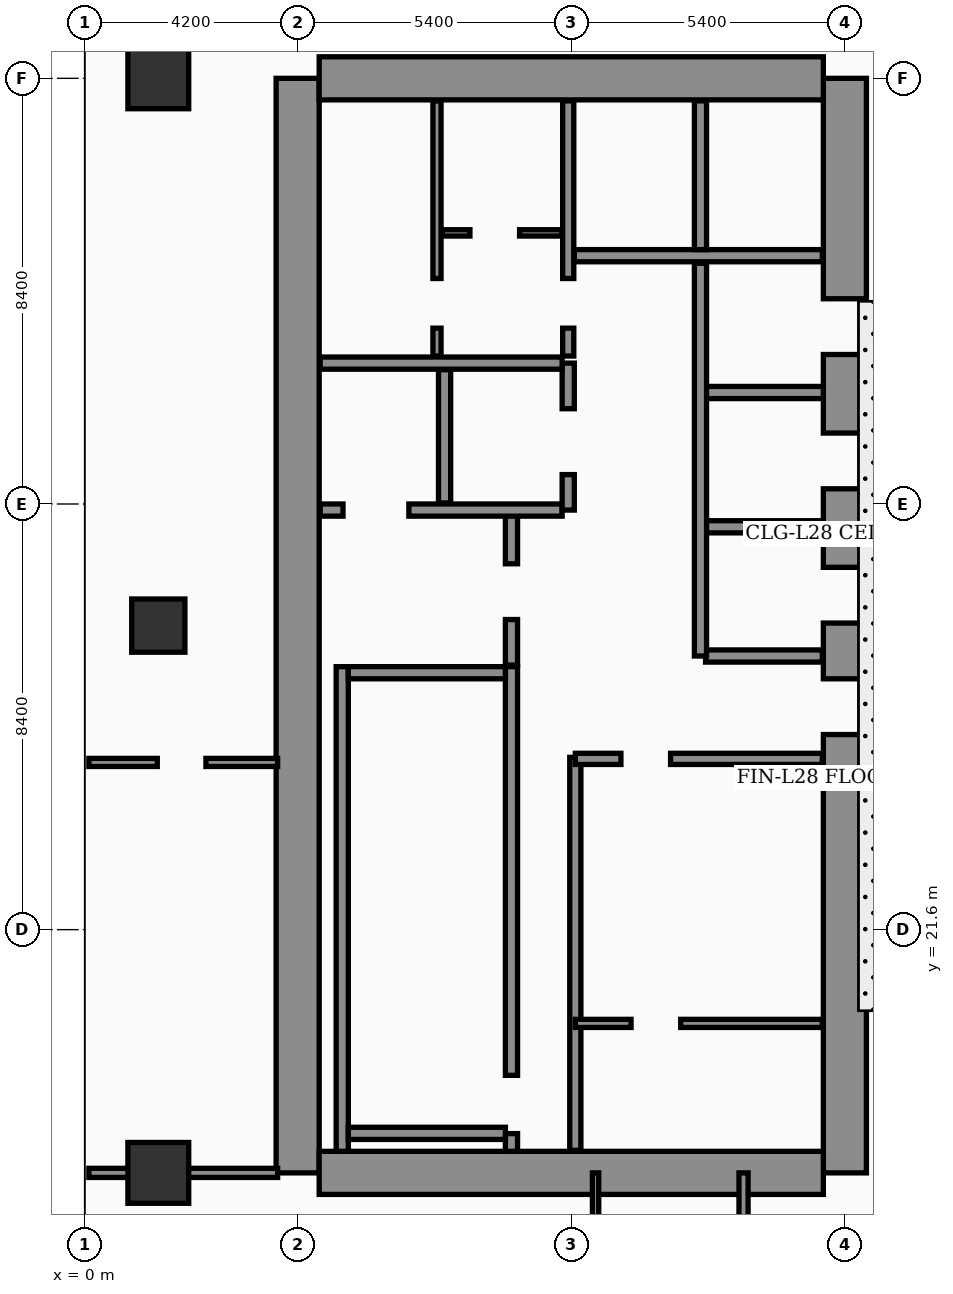
"""IFC4 building model, lengths in metres.
Left out: names, types, materials, properties, quantities, classifications, styles, units other than length and angle.
Written with IfcOpenShell. Run it as: python <this file> out.ifc"""

import sys

from ifc_helpers import new_model, si_unit, direction, frame, frame_2d, origin, origin_2d, place, context, subcontext, project, spatial, rectangle, extrude, element, fill, save


model = new_model("IFC4")
c1 = context("Model", 3, precision=1e-05, world=origin(), true_north=direction((0.0, 1.0)))
c2 = subcontext(c1, "Body", "Model", "MODEL_VIEW")
j1 = project(units=[si_unit("LENGTHUNIT", "METRE"), si_unit("PLANEANGLEUNIT", "RADIAN")], contexts=[c1])
p1 = place(None, origin())
s1 = spatial("IfcSite", under=j1, at=p1, CompositionType="ELEMENT")
p2 = place(p1, origin())
s2 = spatial("IfcBuilding", under=s1, at=p2, CompositionType="ELEMENT")
p3 = place(p2, frame((0.0, 0.0, 116.4)))
s3 = spatial("IfcBuildingStorey", under=s2, at=p3, CompositionType="ELEMENT", Elevation=116.4)
p4 = place(p3, frame((4.2, 16.8, 0.0), z_axis=(0.0, 0.0, 1.0), x_axis=(0.0, 1.0, 0.0)))
e1 = element("IfcWall", 1, at=p4, inside=s3, PredefinedType="SHEAR", context=c2, shape_type="SweptSolid", body=[
    extrude(rectangle(XDim=21.6, YDim=0.85, at=frame_2d((10.8, 0.0))), origin(), (0.0, 0.0, 1.0), 3.56),
])
p5 = place(p3, frame((15.0, 16.8, 0.0), z_axis=(0.0, 0.0, 1.0), x_axis=(0.0, 1.0, 0.0)))
e2 = element("IfcWall", 2, at=p5, inside=s3, PredefinedType="SHEAR", context=c2, shape_type="SweptSolid", body=[
    extrude(rectangle(XDim=21.6, YDim=0.85, at=frame_2d((10.8, 0.0))), origin(), (0.0, 0.0, 1.0), 3.56),
])
p6 = place(p5, frame((8.65, 0.0, 0.0)))
e3 = element("IfcOpeningElement", 3, at=p6, cuts=e2, PredefinedType="OPENING", context=c2, shape_type="SweptSolid", body=[
    extrude(rectangle(XDim=1.1, YDim=2.2, at=frame_2d((0.55, 1.1))), frame((0.0, 0.435, 0.0), z_axis=(0.0, -1.0, 0.0), x_axis=(1.0, 0.0, 0.0)), (0.0, 0.0, 1.0), 0.87),
])
p7 = place(p5, frame((10.85, 0.0, 0.0)))
e4 = element("IfcOpeningElement", 4, at=p7, cuts=e2, PredefinedType="OPENING", context=c2, shape_type="SweptSolid", body=[
    extrude(rectangle(XDim=1.1, YDim=2.2, at=frame_2d((0.55, 1.1))), frame((0.0, 0.435, 0.0), z_axis=(0.0, -1.0, 0.0), x_axis=(1.0, 0.0, 0.0)), (0.0, 0.0, 1.0), 0.87),
])
p8 = place(p5, frame((13.5, 0.0, 0.0)))
e5 = element("IfcOpeningElement", 5, at=p8, cuts=e2, PredefinedType="OPENING", context=c2, shape_type="SweptSolid", body=[
    extrude(rectangle(XDim=1.1, YDim=2.2, at=frame_2d((0.55, 1.1))), frame((0.0, 0.435, 0.0), z_axis=(0.0, -1.0, 0.0), x_axis=(1.0, 0.0, 0.0)), (0.0, 0.0, 1.0), 0.87),
])
p9 = place(p5, frame((16.15, 0.0, 0.0)))
e6 = element("IfcOpeningElement", 6, at=p9, cuts=e2, PredefinedType="OPENING", context=c2, shape_type="SweptSolid", body=[
    extrude(rectangle(XDim=1.1, YDim=2.2, at=frame_2d((0.55, 1.1))), frame((0.0, 0.435, 0.0), z_axis=(0.0, -1.0, 0.0), x_axis=(1.0, 0.0, 0.0)), (0.0, 0.0, 1.0), 0.87),
])
for number, where, z_axis, x_axis in (
    (7, (4.625, 38.4, 0.0), (0.0, 0.0, 1.0), (1.0, 0.0, 0.0)),
    (8, (4.625, 16.8, 0.0), (0.0, 0.0, 1.0), (1.0, 0.0, 0.0)),
):
    element("IfcWall", number, at=place(p3, frame(where, z_axis=z_axis, x_axis=x_axis)), inside=s3, PredefinedType="SHEAR", context=c2, shape_type="SweptSolid", body=[
        extrude(rectangle(XDim=9.95, YDim=0.85, at=frame_2d((4.975, 0.0))), origin(), (0.0, 0.0, 1.0), 3.56),
    ])
p10 = place(p3, frame((5.08, 17.225, 0.0), z_axis=(0.0, 0.0, 1.0), x_axis=(0.0, 1.0, 0.0)))
e9 = element("IfcWall", 9, at=p10, inside=s3, PredefinedType="SOLIDWALL", context=c2, shape_type="SweptSolid", body=[
    extrude(rectangle(XDim=9.565, YDim=0.24, at=frame_2d((4.782, 0.0))), origin(), (0.0, 0.0, 1.0), 3.56),
])
p11 = place(p3, frame((8.42, 17.225, 0.0), z_axis=(0.0, 0.0, 1.0), x_axis=(0.0, 1.0, 0.0)))
e10 = element("IfcWall", 10, at=p11, inside=s3, PredefinedType="SOLIDWALL", context=c2, shape_type="SweptSolid", body=[
    extrude(rectangle(XDim=9.565, YDim=0.24, at=frame_2d((4.782, 0.0))), origin(), (0.0, 0.0, 1.0), 3.56),
])
p12 = place(p11, frame((0.35, 0.0, 0.0)))
e11 = element("IfcOpeningElement", 11, at=p12, cuts=e10, PredefinedType="OPENING", context=c2, shape_type="SweptSolid", body=[
    extrude(rectangle(XDim=1.15, YDim=2.2, at=frame_2d((0.575, 1.1))), frame((0.0, 0.13, 0.0), z_axis=(0.0, -1.0, 0.0), x_axis=(1.0, 0.0, 0.0)), (0.0, 0.0, 1.0), 0.26),
])
for number, where, z_axis, x_axis in (
    (12, (5.2, 17.58, 0.0), (0.0, 0.0, 1.0), (1.0, 0.0, 0.0)),
    (13, (5.2, 26.67, 0.0), (0.0, 0.0, 1.0), (1.0, 0.0, 0.0)),
):
    element("IfcWall", number, at=place(p3, frame(where, z_axis=z_axis, x_axis=x_axis)), inside=s3, PredefinedType="SOLIDWALL", context=c2, shape_type="SweptSolid", body=[
        extrude(rectangle(XDim=3.1, YDim=0.24, at=frame_2d((1.55, 0.0))), origin(), (0.0, 0.0, 1.0), 3.56),
    ])
for number, where, z_axis, x_axis in (
    (14, (12.18, 29.55, 0.0), (0.0, 0.0, 1.0), (1.0, 0.0, 0.0)),
    (15, (12.18, 32.2, 0.0), (0.0, 0.0, 1.0), (1.0, 0.0, 0.0)),
):
    element("IfcWall", number, at=place(p3, frame(where, z_axis=z_axis, x_axis=x_axis)), inside=s3, PredefinedType="SOLIDWALL", context=c2, shape_type="SweptSolid", body=[
        extrude(rectangle(XDim=2.395, YDim=0.24, at=frame_2d((1.198, 0.0))), origin(), (0.0, 0.0, 1.0), 3.56),
    ])
p13 = place(p3, frame((1.45, 16.8, 0.0), z_axis=(0.0, 0.0, 1.0), x_axis=(1.0, 0.0, 0.0)))
e16 = element("IfcColumn", 16, at=p13, inside=s3, PredefinedType="COLUMN", context=c2, shape_type="SweptSolid", body=[
    extrude(rectangle(XDim=1.2, YDim=1.2, at=origin_2d()), origin(), (0.0, 0.0, 1.0), 3.56),
])
p14 = place(p3, frame((1.45, 27.6, 0.0), z_axis=(0.0, 0.0, 1.0), x_axis=(1.0, 0.0, 0.0)))
e17 = element("IfcColumn", 17, at=p14, inside=s3, PredefinedType="COLUMN", context=c2, shape_type="SweptSolid", body=[
    extrude(rectangle(XDim=1.05, YDim=1.05, at=origin_2d()), origin(), (0.0, 0.0, 1.0), 3.56),
])
p15 = place(p3, frame((1.45, 38.4, 0.0), z_axis=(0.0, 0.0, 1.0), x_axis=(1.0, 0.0, 0.0)))
e18 = element("IfcColumn", 18, at=p15, inside=s3, PredefinedType="COLUMN", context=c2, shape_type="SweptSolid", body=[
    extrude(rectangle(XDim=1.2, YDim=1.2, at=origin_2d()), origin(), (0.0, 0.0, 1.0), 3.56),
])
p16 = place(p3, frame((8.42, 26.82, 0.0), z_axis=(0.0, 0.0, 1.0), x_axis=(0.0, 1.0, 0.0)))
e19 = element("IfcWall", 19, at=p16, inside=s3, PredefinedType="SOLIDWALL", context=c2, shape_type="SweptSolid", body=[
    extrude(rectangle(XDim=3.0, YDim=0.24, at=frame_2d((1.5, 0.0))), origin(), (0.0, 0.0, 1.0), 3.56),
])
p17 = place(p16, frame((0.9, 0.0, 0.0)))
e20 = element("IfcOpeningElement", 20, at=p17, cuts=e19, PredefinedType="OPENING", context=c2, shape_type="SweptSolid", body=[
    extrude(rectangle(XDim=1.1, YDim=2.2, at=frame_2d((0.55, 1.1))), frame((0.0, 0.13, 0.0), z_axis=(0.0, -1.0, 0.0), x_axis=(1.0, 0.0, 0.0)), (0.0, 0.0, 1.0), 0.26),
])
p18 = place(p3, frame((4.645, 29.88, 0.0), z_axis=(0.0, 0.0, 1.0), x_axis=(1.0, 0.0, 0.0)))
e21 = element("IfcWall", 21, at=p18, inside=s3, PredefinedType="SOLIDWALL", context=c2, shape_type="SweptSolid", body=[
    extrude(rectangle(XDim=4.775, YDim=0.24, at=frame_2d((2.387, 0.0))), origin(), (0.0, 0.0, 1.0), 3.56),
])
p19 = place(p18, frame((0.45, 0.0, 0.0)))
e22 = element("IfcOpeningElement", 22, at=p19, cuts=e21, PredefinedType="OPENING", context=c2, shape_type="SweptSolid", body=[
    extrude(rectangle(XDim=1.3, YDim=2.35, at=frame_2d((0.65, 1.175))), frame((0.0, 0.13, 0.0), z_axis=(0.0, -1.0, 0.0), x_axis=(1.0, 0.0, 0.0)), (0.0, 0.0, 1.0), 0.26),
])
p20 = place(p3, frame((7.1, 30.02, 0.0), z_axis=(0.0, 0.0, 1.0), x_axis=(0.0, 1.0, 0.0)))
e23 = element("IfcWall", 23, at=p20, inside=s3, PredefinedType="SOLIDWALL", context=c2, shape_type="SweptSolid", body=[
    extrude(rectangle(XDim=2.63, YDim=0.24, at=frame_2d((1.315, 0.0))), origin(), (0.0, 0.0, 1.0), 3.56),
])
p21 = place(p3, frame((9.54, 29.88, 0.0), z_axis=(0.0, 0.0, 1.0), x_axis=(0.0, 1.0, 0.0)))
e24 = element("IfcWall", 24, at=p21, inside=s3, PredefinedType="SOLIDWALL", context=c2, shape_type="SweptSolid", body=[
    extrude(rectangle(XDim=2.9, YDim=0.24, at=frame_2d((1.45, 0.0))), origin(), (0.0, 0.0, 1.0), 3.56),
])
p22 = place(p21, frame((0.7, 0.0, 0.0)))
e25 = element("IfcOpeningElement", 25, at=p22, cuts=e24, PredefinedType="OPENING", context=c2, shape_type="SweptSolid", body=[
    extrude(rectangle(XDim=1.3, YDim=2.35, at=frame_2d((0.65, 1.175))), frame((0.0, 0.13, 0.0), z_axis=(0.0, -1.0, 0.0), x_axis=(1.0, 0.0, 0.0)), (0.0, 0.0, 1.0), 0.26),
])
p23 = place(p3, frame((4.645, 32.78, 0.0), z_axis=(0.0, 0.0, 1.0), x_axis=(1.0, 0.0, 0.0)))
e26 = element("IfcWall", 26, at=p23, inside=s3, PredefinedType="SOLIDWALL", context=c2, shape_type="SweptSolid", body=[
    extrude(rectangle(XDim=4.775, YDim=0.24, at=frame_2d((2.387, 0.0))), origin(), (0.0, 0.0, 1.0), 3.19),
])
p24 = place(p3, frame((9.68, 17.245, 0.0), z_axis=(0.0, 0.0, 1.0), x_axis=(0.0, 1.0, 0.0)))
e27 = element("IfcWall", 27, at=p24, inside=s3, PredefinedType="SOLIDWALL", context=c2, shape_type="SweptSolid", body=[
    extrude(rectangle(XDim=7.755, YDim=0.22, at=frame_2d((3.877, 0.0))), origin(), (0.0, 0.0, 1.0), 3.56),
])
p25 = place(p3, frame((6.95, 32.92, 0.0), z_axis=(0.0, 0.0, 1.0), x_axis=(0.0, 1.0, 0.0)))
e28 = element("IfcWall", 28, at=p25, inside=s3, PredefinedType="PARTITIONING", context=c2, shape_type="SweptSolid", body=[
    extrude(rectangle(XDim=5.035, YDim=0.16, at=frame_2d((2.518, 0.0))), origin(), (0.0, 0.0, 1.0), 3.56),
])
p26 = place(p25, frame((0.55, 0.0, 0.0)))
e29 = element("IfcOpeningElement", 29, at=p26, cuts=e28, PredefinedType="OPENING", context=c2, shape_type="SweptSolid", body=[
    extrude(rectangle(XDim=0.98, YDim=2.15, at=frame_2d((0.49, 1.075))), frame((0.0, 0.09, 0.0), z_axis=(0.0, -1.0, 0.0), x_axis=(1.0, 0.0, 0.0)), (0.0, 0.0, 1.0), 0.18),
])
p27 = place(p3, frame((7.05, 35.35, 0.0), z_axis=(0.0, 0.0, 1.0), x_axis=(1.0, 0.0, 0.0)))
e30 = element("IfcWall", 30, at=p27, inside=s3, PredefinedType="PARTITIONING", context=c2, shape_type="SweptSolid", body=[
    extrude(rectangle(XDim=2.37, YDim=0.125, at=frame_2d((1.185, 0.0))), origin(), (0.0, 0.0, 1.0), 3.56),
])
p28 = place(p27, frame((0.55, 0.0, 0.0)))
e31 = element("IfcOpeningElement", 31, at=p28, cuts=e30, PredefinedType="OPENING", context=c2, shape_type="SweptSolid", body=[
    extrude(rectangle(XDim=0.98, YDim=2.15, at=frame_2d((0.49, 1.075))), frame((0.0, 0.073, 0.0), z_axis=(0.0, -1.0, 0.0), x_axis=(1.0, 0.0, 0.0)), (0.0, 0.0, 1.0), 0.145),
])
p29 = place(p3, frame((9.54, 32.92, 0.0), z_axis=(0.0, 0.0, 1.0), x_axis=(0.0, 1.0, 0.0)))
e32 = element("IfcWall", 32, at=p29, inside=s3, PredefinedType="SOLIDWALL", context=c2, shape_type="SweptSolid", body=[
    extrude(rectangle(XDim=5.035, YDim=0.22, at=frame_2d((2.518, 0.0))), origin(), (0.0, 0.0, 1.0), 3.56),
])
p30 = place(p29, frame((0.55, 0.0, 0.0)))
e33 = element("IfcOpeningElement", 33, at=p30, cuts=e32, PredefinedType="OPENING", context=c2, shape_type="SweptSolid", body=[
    extrude(rectangle(XDim=0.98, YDim=2.15, at=frame_2d((0.49, 1.075))), frame((0.0, 0.12, 0.0), z_axis=(0.0, -1.0, 0.0), x_axis=(1.0, 0.0, 0.0)), (0.0, 0.0, 1.0), 0.24),
])
p31 = place(p3, frame((9.68, 19.75, 0.0), z_axis=(0.0, 0.0, 1.0), x_axis=(1.0, 0.0, 0.0)))
e34 = element("IfcWall", 34, at=p31, inside=s3, PredefinedType="PARTITIONING", context=c2, shape_type="SweptSolid", body=[
    extrude(rectangle(XDim=4.875, YDim=0.16, at=frame_2d((2.438, 0.0))), origin(), (0.0, 0.0, 1.0), 3.56),
])
p32 = place(p31, frame((1.1, 0.0, 0.0)))
e35 = element("IfcOpeningElement", 35, at=p32, cuts=e34, PredefinedType="OPENING", context=c2, shape_type="SweptSolid", body=[
    extrude(rectangle(XDim=0.98, YDim=2.15, at=frame_2d((0.49, 1.075))), frame((0.0, 0.09, 0.0), z_axis=(0.0, -1.0, 0.0), x_axis=(1.0, 0.0, 0.0)), (0.0, 0.0, 1.0), 0.18),
])
p33 = place(p3, frame((9.68, 24.97, 0.0), z_axis=(0.0, 0.0, 1.0), x_axis=(1.0, 0.0, 0.0)))
e36 = element("IfcWall", 36, at=p33, inside=s3, PredefinedType="SOLIDWALL", context=c2, shape_type="SweptSolid", body=[
    extrude(rectangle(XDim=4.875, YDim=0.22, at=frame_2d((2.438, 0.0))), origin(), (0.0, 0.0, 1.0), 2.84),
])
p34 = place(p33, frame((0.9, 0.0, 0.0)))
e37 = element("IfcOpeningElement", 37, at=p34, cuts=e36, PredefinedType="OPENING", context=c2, shape_type="SweptSolid", body=[
    extrude(rectangle(XDim=0.98, YDim=2.15, at=frame_2d((0.49, 1.075))), frame((0.0, 0.12, 0.0), z_axis=(0.0, -1.0, 0.0), x_axis=(1.0, 0.0, 0.0)), (0.0, 0.0, 1.0), 0.24),
])
p35 = place(p3, frame((12.25, 27.0, 0.0), z_axis=(0.0, 0.0, 1.0), x_axis=(1.0, 0.0, 0.0)))
e38 = element("IfcWall", 38, at=p35, inside=s3, PredefinedType="SOLIDWALL", context=c2, shape_type="SweptSolid", body=[
    extrude(rectangle(XDim=2.305, YDim=0.24, at=frame_2d((1.152, 0.0))), origin(), (0.0, 0.0, 1.0), 3.56),
])
p36 = place(p3, frame((12.15, 27.0, 0.0), z_axis=(0.0, 0.0, 1.0), x_axis=(0.0, 1.0, 0.0)))
e39 = element("IfcWall", 39, at=p36, inside=s3, PredefinedType="SOLIDWALL", context=c2, shape_type="SweptSolid", body=[
    extrude(rectangle(XDim=7.75, YDim=0.24, at=frame_2d((3.875, 0.0))), origin(), (0.0, 0.0, 1.0), 3.56),
])
p37 = place(p3, frame((9.66, 34.9, 0.0), z_axis=(0.0, 0.0, 1.0), x_axis=(1.0, 0.0, 0.0)))
e40 = element("IfcWall", 40, at=p37, inside=s3, PredefinedType="SOLIDWALL", context=c2, shape_type="SweptSolid", body=[
    extrude(rectangle(XDim=4.895, YDim=0.24, at=frame_2d((2.448, 0.0))), origin(), (0.0, 0.0, 1.0), 3.56),
])
p38 = place(p3, frame((12.15, 35.02, 0.0), z_axis=(0.0, 0.0, 1.0), x_axis=(0.0, 1.0, 0.0)))
e41 = element("IfcWall", 41, at=p38, inside=s3, PredefinedType="SOLIDWALL", context=c2, shape_type="SweptSolid", body=[
    extrude(rectangle(XDim=2.935, YDim=0.24, at=frame_2d((1.468, 0.0))), origin(), (0.0, 0.0, 1.0), 3.56),
])
p39 = place(p3, frame((0.08, 24.9, 0.0), z_axis=(0.0, 0.0, 1.0), x_axis=(1.0, 0.0, 0.0)))
e42 = element("IfcWall", 42, at=p39, inside=s3, PredefinedType="PARTITIONING", context=c2, shape_type="SweptSolid", body=[
    extrude(rectangle(XDim=3.725, YDim=0.16, at=frame_2d((1.862, 0.0))), origin(), (0.0, 0.0, 1.0), 3.04),
])
p40 = place(p39, frame((1.35, 0.0, 0.0)))
e43 = element("IfcOpeningElement", 43, at=p40, cuts=e42, PredefinedType="OPENING", context=c2, shape_type="SweptSolid", body=[
    extrude(rectangle(XDim=0.96, YDim=2.2, at=frame_2d((0.48, 1.1))), frame((0.0, 0.09, 0.0), z_axis=(0.0, -1.0, 0.0), x_axis=(1.0, 0.0, 0.0)), (0.0, 0.0, 1.0), 0.18),
])
p41 = place(p3, frame((0.08, 16.8, 0.0), z_axis=(0.0, 0.0, 1.0), x_axis=(1.0, 0.0, 0.0)))
e44 = element("IfcWall", 44, at=p41, inside=s3, PredefinedType="PARTITIONING", context=c2, shape_type="SweptSolid", body=[
    extrude(rectangle(XDim=3.725, YDim=0.18, at=frame_2d((1.862, 0.0))), origin(), (0.0, 0.0, 1.0), 2.84),
])
p42 = place(p3, frame((10.08, 14.55, 0.0), z_axis=(0.0, 0.0, 1.0), x_axis=(0.0, 1.0, 0.0)))
e45 = element("IfcWall", 45, at=p42, inside=s3, PredefinedType="PARTITIONING", context=c2, shape_type="SweptSolid", body=[
    extrude(rectangle(XDim=2.25, YDim=0.125, at=frame_2d((1.125, 0.0))), origin(), (0.0, 0.0, 1.0), 3.56),
])
p43 = place(p3, frame((13.0, 2.44, 0.0), z_axis=(0.0, 0.0, 1.0), x_axis=(0.0, 1.0, 0.0)))
e46 = element("IfcWall", 46, at=p43, inside=s3, PredefinedType="PARTITIONING", context=c2, shape_type="SweptSolid", body=[
    extrude(rectangle(XDim=14.36, YDim=0.18, at=frame_2d((7.18, 0.0))), origin(), (0.0, 0.0, 1.0), 2.84),
])
p44 = place(p43, frame((3.01, 0.0, 0.0)))
e47 = element("IfcOpeningElement", 47, at=p44, cuts=e46, PredefinedType="OPENING", context=c2, shape_type="SweptSolid", body=[
    extrude(rectangle(XDim=1.02, YDim=2.2, at=frame_2d((0.51, 1.1))), frame((0.0, 0.1, 0.0), z_axis=(0.0, -1.0, 0.0), x_axis=(1.0, 0.0, 0.0)), (0.0, 0.0, 1.0), 0.2),
])
p45 = place(p17, origin())
e48 = element("IfcDoor", 48, at=p45, inside=s3, OperationType="SINGLE_SWING_RIGHT", PredefinedType="DOOR", context=c2, shape_type="SweptSolid", body=[
    extrude(rectangle(XDim=1.1, YDim=2.2, at=frame_2d((0.55, 1.1))), frame((0.0, 0.025, 0.0), z_axis=(0.0, -1.0, 0.0), x_axis=(1.0, 0.0, 0.0)), (0.0, 0.0, 1.0), 0.05),
])
fill(e20, e48)
p46 = place(p19, origin())
e49 = element("IfcDoor", 49, at=p46, inside=s3, OperationType="DOUBLE_DOOR_SLIDING", PredefinedType="DOOR", context=c2, shape_type="SweptSolid", body=[
    extrude(rectangle(XDim=1.3, YDim=2.35, at=frame_2d((0.65, 1.175))), frame((0.0, 0.025, 0.0), z_axis=(0.0, -1.0, 0.0), x_axis=(1.0, 0.0, 0.0)), (0.0, 0.0, 1.0), 0.05),
])
fill(e22, e49)
p47 = place(p22, origin())
e50 = element("IfcDoor", 50, at=p47, inside=s3, OperationType="DOUBLE_DOOR_SLIDING", PredefinedType="DOOR", context=c2, shape_type="SweptSolid", body=[
    extrude(rectangle(XDim=1.3, YDim=2.35, at=frame_2d((0.65, 1.175))), frame((0.0, 0.025, 0.0), z_axis=(0.0, -1.0, 0.0), x_axis=(1.0, 0.0, 0.0)), (0.0, 0.0, 1.0), 0.05),
])
fill(e25, e50)
p48 = place(p26, origin())
e51 = element("IfcDoor", 51, at=p48, inside=s3, OperationType="SINGLE_SWING_LEFT", PredefinedType="DOOR", context=c2, shape_type="SweptSolid", body=[
    extrude(rectangle(XDim=0.98, YDim=2.15, at=frame_2d((0.49, 1.075))), frame((0.0, 0.025, 0.0), z_axis=(0.0, -1.0, 0.0), x_axis=(1.0, 0.0, 0.0)), (0.0, 0.0, 1.0), 0.05),
])
fill(e29, e51)
p49 = place(p28, origin())
e52 = element("IfcDoor", 52, at=p49, inside=s3, OperationType="SINGLE_SWING_RIGHT", PredefinedType="DOOR", context=c2, shape_type="SweptSolid", body=[
    extrude(rectangle(XDim=0.98, YDim=2.15, at=frame_2d((0.49, 1.075))), frame((0.0, 0.025, 0.0), z_axis=(0.0, -1.0, 0.0), x_axis=(1.0, 0.0, 0.0)), (0.0, 0.0, 1.0), 0.05),
])
fill(e31, e52)
p50 = place(p30, origin())
e53 = element("IfcDoor", 53, at=p50, inside=s3, OperationType="SINGLE_SWING_LEFT", PredefinedType="DOOR", context=c2, shape_type="SweptSolid", body=[
    extrude(rectangle(XDim=0.98, YDim=2.15, at=frame_2d((0.49, 1.075))), frame((0.0, 0.025, 0.0), z_axis=(0.0, -1.0, 0.0), x_axis=(1.0, 0.0, 0.0)), (0.0, 0.0, 1.0), 0.05),
])
fill(e33, e53)
p51 = place(p32, origin())
e54 = element("IfcDoor", 54, at=p51, inside=s3, OperationType="SINGLE_SWING_LEFT", PredefinedType="DOOR", context=c2, shape_type="SweptSolid", body=[
    extrude(rectangle(XDim=0.98, YDim=2.15, at=frame_2d((0.49, 1.075))), frame((0.0, 0.025, 0.0), z_axis=(0.0, -1.0, 0.0), x_axis=(1.0, 0.0, 0.0)), (0.0, 0.0, 1.0), 0.05),
])
fill(e35, e54)
p52 = place(p34, origin())
e55 = element("IfcDoor", 55, at=p52, inside=s3, OperationType="SINGLE_SWING_RIGHT", PredefinedType="DOOR", context=c2, shape_type="SweptSolid", body=[
    extrude(rectangle(XDim=0.98, YDim=2.15, at=frame_2d((0.49, 1.075))), frame((0.0, 0.025, 0.0), z_axis=(0.0, -1.0, 0.0), x_axis=(1.0, 0.0, 0.0)), (0.0, 0.0, 1.0), 0.05),
])
fill(e37, e55)
p53 = place(p40, origin())
e56 = element("IfcDoor", 56, at=p53, inside=s3, OperationType="SINGLE_SWING_LEFT", PredefinedType="DOOR", context=c2, shape_type="SweptSolid", body=[
    extrude(rectangle(XDim=0.96, YDim=2.2, at=frame_2d((0.48, 1.1))), frame((0.0, 0.025, 0.0), z_axis=(0.0, -1.0, 0.0), x_axis=(1.0, 0.0, 0.0)), (0.0, 0.0, 1.0), 0.05),
])
fill(e43, e56)
p54 = place(p12, origin())
e57 = element("IfcDoor", 57, at=p54, inside=s3, OperationType="SINGLE_SWING_LEFT", PredefinedType="DOOR", context=c2, shape_type="SweptSolid", body=[
    extrude(rectangle(XDim=1.15, YDim=2.2, at=frame_2d((0.575, 1.1))), frame((0.0, 0.025, 0.0), z_axis=(0.0, -1.0, 0.0), x_axis=(1.0, 0.0, 0.0)), (0.0, 0.0, 1.0), 0.05),
])
fill(e11, e57)
p55 = place(p6, origin())
e58 = element("IfcDoor", 58, at=p55, inside=s3, OperationType="SINGLE_SWING_LEFT", PredefinedType="DOOR", context=c2, shape_type="SweptSolid", body=[
    extrude(rectangle(XDim=1.1, YDim=2.2, at=frame_2d((0.55, 1.1))), frame((0.0, 0.025, 0.0), z_axis=(0.0, -1.0, 0.0), x_axis=(1.0, 0.0, 0.0)), (0.0, 0.0, 1.0), 0.05),
])
fill(e3, e58)
p56 = place(p7, origin())
e59 = element("IfcDoor", 59, at=p56, inside=s3, OperationType="DOUBLE_DOOR_SLIDING", PredefinedType="DOOR", context=c2, shape_type="SweptSolid", body=[
    extrude(rectangle(XDim=1.1, YDim=2.2, at=frame_2d((0.55, 1.1))), frame((0.0, 0.025, 0.0), z_axis=(0.0, -1.0, 0.0), x_axis=(1.0, 0.0, 0.0)), (0.0, 0.0, 1.0), 0.05),
])
fill(e4, e59)
p57 = place(p8, origin())
e60 = element("IfcDoor", 60, at=p57, inside=s3, OperationType="DOUBLE_DOOR_SLIDING", PredefinedType="DOOR", context=c2, shape_type="SweptSolid", body=[
    extrude(rectangle(XDim=1.1, YDim=2.2, at=frame_2d((0.55, 1.1))), frame((0.0, 0.025, 0.0), z_axis=(0.0, -1.0, 0.0), x_axis=(1.0, 0.0, 0.0)), (0.0, 0.0, 1.0), 0.05),
])
fill(e5, e60)
p58 = place(p9, origin())
e61 = element("IfcDoor", 61, at=p58, inside=s3, OperationType="DOUBLE_DOOR_SLIDING", PredefinedType="DOOR", context=c2, shape_type="SweptSolid", body=[
    extrude(rectangle(XDim=1.1, YDim=2.2, at=frame_2d((0.55, 1.1))), frame((0.0, 0.025, 0.0), z_axis=(0.0, -1.0, 0.0), x_axis=(1.0, 0.0, 0.0)), (0.0, 0.0, 1.0), 0.05),
])
fill(e6, e61)
save(model, sys.argv[1])
